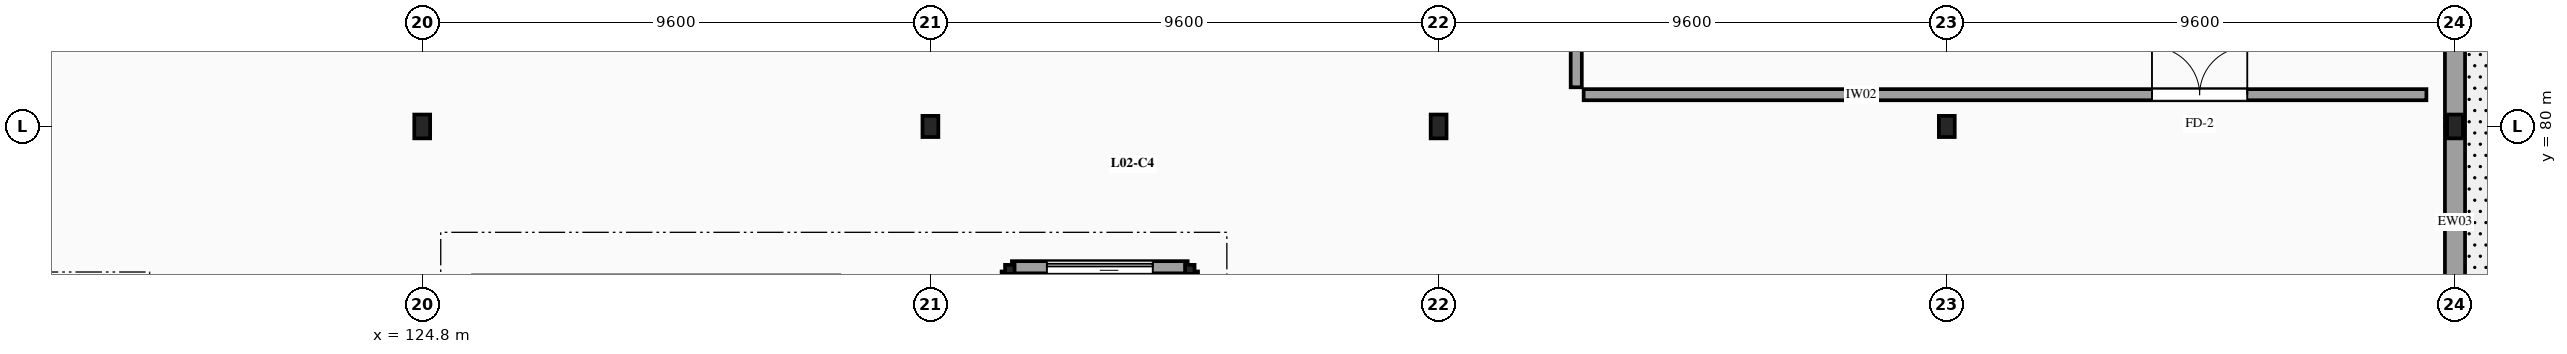
"""IFC4 building model, lengths in metres.
Left out: names, types, materials, properties, quantities, classifications, styles, units other than length and angle.
Written with IfcOpenShell. Run it as: python <this file> out.ifc"""

import sys

from ifc_helpers import new_model, si_unit, direction, frame, frame_2d, origin, origin_2d, place, context, subcontext, project, spatial, rectangle, i_section, extrude, element, fill, save


model = new_model("IFC4")
c1 = context("Model", 3, precision=1e-05, world=origin(), true_north=direction((0.0, 1.0)))
c2 = subcontext(c1, "Body", "Model", "MODEL_VIEW")
j1 = project(units=[si_unit("LENGTHUNIT", "METRE"), si_unit("PLANEANGLEUNIT", "RADIAN")], contexts=[c1])
p1 = place(None, origin())
s1 = spatial("IfcSite", under=j1, at=p1, CompositionType="ELEMENT")
p2 = place(p1, origin())
s2 = spatial("IfcBuilding", under=s1, at=p2, CompositionType="ELEMENT")
p3 = place(p2, frame((0.0, 0.0, 8.7)))
s3 = spatial("IfcBuildingStorey", under=s2, at=p3, CompositionType="ELEMENT", Elevation=8.7)
p4 = place(p3, frame((124.8, 80.0, -0.26), z_axis=(0.0, 0.0, 1.0), x_axis=(1.0, 0.0, 0.0)))
e1 = element("IfcColumn", 1, at=p4, inside=s3, PredefinedType="COLUMN", context=c2, shape_type="SweptSolid", body=[
    extrude(i_section(OverallWidth=0.3, OverallDepth=0.45, WebThickness=0.014, FlangeThickness=0.026, FilletRadius=0.027, at=origin_2d()), origin(), (0.0, 0.0, 1.0), 4.2),
])
p5 = place(p3, frame((134.4, 80.0, -0.26), z_axis=(0.0, 0.0, 1.0), x_axis=(1.0, 0.0, 0.0)))
e2 = element("IfcColumn", 2, at=p5, inside=s3, PredefinedType="COLUMN", context=c2, shape_type="SweptSolid", body=[
    extrude(i_section(OverallWidth=0.3, OverallDepth=0.4, WebThickness=0.013, FlangeThickness=0.024, FilletRadius=0.027, at=origin_2d()), origin(), (0.0, 0.0, 1.0), 4.2),
])
p6 = place(p3, frame((144.0, 80.0, -0.26), z_axis=(0.0, 0.0, 1.0), x_axis=(1.0, 0.0, 0.0)))
e3 = element("IfcColumn", 3, at=p6, inside=s3, PredefinedType="COLUMN", context=c2, shape_type="SweptSolid", body=[
    extrude(i_section(OverallWidth=0.3, OverallDepth=0.45, WebThickness=0.014, FlangeThickness=0.026, FilletRadius=0.027, at=origin_2d()), origin(), (0.0, 0.0, 1.0), 4.2),
])
p7 = place(p3, frame((153.6, 80.0, -0.26), z_axis=(0.0, 0.0, 1.0), x_axis=(1.0, 0.0, 0.0)))
e4 = element("IfcColumn", 4, at=p7, inside=s3, PredefinedType="COLUMN", context=c2, shape_type="SweptSolid", body=[
    extrude(i_section(OverallWidth=0.3, OverallDepth=0.4, WebThickness=0.013, FlangeThickness=0.024, FilletRadius=0.027, at=origin_2d()), origin(), (0.0, 0.0, 1.0), 4.2),
])
p8 = place(p3, frame((163.2, 80.0, -0.26), z_axis=(0.0, 0.0, 1.0), x_axis=(1.0, 0.0, 0.0)))
e5 = element("IfcColumn", 5, at=p8, inside=s3, PredefinedType="COLUMN", context=c2, shape_type="SweptSolid", body=[
    extrude(i_section(OverallWidth=0.3, OverallDepth=0.45, WebThickness=0.014, FlangeThickness=0.026, FilletRadius=0.027, at=origin_2d()), origin(), (0.0, 0.0, 1.0), 4.2),
])
for number, where, z_axis, x_axis in (
    (6, (139.3, 77.3, 0.0), (0.0, 0.0, 1.0), (1.0, 0.0, 0.0)),
    (7, (135.9, 77.3, 0.0), (0.0, 0.0, 1.0), (1.0, 0.0, 0.0)),
):
    element("IfcColumn", number, at=place(p3, frame(where, z_axis=z_axis, x_axis=x_axis)), inside=s3, PredefinedType="COLUMN", context=c2, shape_type="SweptSolid", body=[
        extrude(i_section(OverallWidth=0.18, OverallDepth=0.171, WebThickness=0.006, FlangeThickness=0.01, FilletRadius=0.015, at=origin_2d()), origin(), (0.0, 0.0, 1.0), 4.2),
    ])
p9 = place(p3, frame((163.2, 72.02, 0.0), z_axis=(0.0, 0.0, 1.0), x_axis=(0.0, 1.0, 0.0)))
e8 = element("IfcWall", 8, at=p9, inside=s3, PredefinedType="SOLIDWALL", context=c2, shape_type="SweptSolid", body=[
    extrude(rectangle(XDim=7.96, YDim=0.38, at=frame_2d((3.98, 0.0))), origin(), (0.0, 0.0, 1.0), 3.36),
])
p10 = place(p9, frame((2.8, 0.0, 0.0)))
e9 = element("IfcOpeningElement", 9, at=p10, cuts=e8, PredefinedType="OPENING", context=c2, shape_type="SweptSolid", body=[
    extrude(rectangle(XDim=1.35, YDim=2.2, at=frame_2d((0.675, 1.1))), frame((0.0, 0.2, 0.0), z_axis=(0.0, -1.0, 0.0), x_axis=(1.0, 0.0, 0.0)), (0.0, 0.0, 1.0), 0.4),
])
p11 = place(p3, frame((163.2, 80.02, 0.0), z_axis=(0.0, 0.0, 1.0), x_axis=(0.0, 1.0, 0.0)))
e10 = element("IfcWall", 10, at=p11, inside=s3, PredefinedType="SOLIDWALL", context=c2, shape_type="SweptSolid", body=[
    extrude(rectangle(XDim=7.96, YDim=0.38, at=frame_2d((3.98, 0.0))), origin(), (0.0, 0.0, 1.0), 3.36),
])
p12 = place(p11, frame((4.9, 0.0, 0.72)))
e11 = element("IfcOpeningElement", 11, at=p12, cuts=e10, PredefinedType="OPENING", context=c2, shape_type="SweptSolid", body=[
    extrude(rectangle(XDim=1.8, YDim=1.6, at=frame_2d((0.9, 0.8))), frame((0.0, 0.2, 0.0), z_axis=(0.0, -1.0, 0.0), x_axis=(1.0, 0.0, 0.0)), (0.0, 0.0, 1.0), 0.4),
])
p13 = place(p3, frame((135.94, 77.34, 0.0), z_axis=(0.0, 0.0, 1.0), x_axis=(1.0, 0.0, 0.0)))
e12 = element("IfcWall", 12, at=p13, inside=s3, PredefinedType="SOLIDWALL", context=c2, shape_type="SweptSolid", body=[
    extrude(rectangle(XDim=3.32, YDim=0.23, at=frame_2d((1.66, 0.0))), origin(), (0.0, 0.0, 1.0), 3.1),
])
p14 = place(p13, frame((0.66, 0.0, 0.0)))
e13 = element("IfcOpeningElement", 13, at=p14, cuts=e12, PredefinedType="OPENING", context=c2, shape_type="SweptSolid", body=[
    extrude(rectangle(XDim=2.0, YDim=2.5, at=frame_2d((1.0, 1.25))), frame((0.0, 0.125, 0.0), z_axis=(0.0, -1.0, 0.0), x_axis=(1.0, 0.0, 0.0)), (0.0, 0.0, 1.0), 0.25),
])
for number, where, z_axis, x_axis in (
    (14, (135.86, 73.14, 0.0), (0.0, 0.0, 1.0), (0.0, 1.0, 0.0)),
    (15, (139.34, 73.14, 0.0), (0.0, 0.0, 1.0), (0.0, 1.0, 0.0)),
):
    element("IfcWall", number, at=place(p3, frame(where, z_axis=z_axis, x_axis=x_axis)), inside=s3, PredefinedType="SOLIDWALL", context=c2, shape_type="SweptSolid", body=[
        extrude(rectangle(XDim=4.12, YDim=0.23, at=frame_2d((2.06, 0.0))), origin(), (0.0, 0.0, 1.0), 3.1),
    ])
p15 = place(p3, frame((146.74, 80.6, 0.0), z_axis=(0.0, 0.0, 1.0), x_axis=(1.0, 0.0, 0.0)))
e16 = element("IfcWall", 16, at=p15, inside=s3, PredefinedType="SOLIDWALL", context=c2, shape_type="SweptSolid", body=[
    extrude(rectangle(XDim=15.92, YDim=0.21, at=frame_2d((7.96, 0.0))), origin(), (0.0, 0.0, 1.0), 3.1),
])
p16 = place(p15, frame((10.736, 0.0, 0.0)))
e17 = element("IfcOpeningElement", 17, at=p16, cuts=e16, PredefinedType="OPENING", context=c2, shape_type="SweptSolid", body=[
    extrude(rectangle(XDim=1.8, YDim=2.4, at=frame_2d((0.9, 1.2))), frame((0.0, 0.115, 0.0), z_axis=(0.0, -1.0, 0.0), x_axis=(1.0, 0.0, 0.0)), (0.0, 0.0, 1.0), 0.23),
])
p17 = place(p3, frame((146.6, 80.74, 0.0), z_axis=(0.0, 0.0, 1.0), x_axis=(0.0, 1.0, 0.0)))
e18 = element("IfcWall", 18, at=p17, inside=s3, PredefinedType="SOLIDWALL", context=c2, shape_type="SweptSolid", body=[
    extrude(rectangle(XDim=15.09, YDim=0.21, at=frame_2d((7.545, 0.0))), origin(), (0.0, 0.0, 1.0), 3.1),
])
p18 = place(p14, origin())
e19 = element("IfcDoor", 19, at=p18, inside=s3, OperationType="SLIDING_TO_RIGHT", PredefinedType="DOOR", context=c2, shape_type="SweptSolid", body=[
    extrude(rectangle(XDim=2.0, YDim=2.5, at=frame_2d((1.0, 1.25))), frame((0.0, 0.025, 0.0), z_axis=(0.0, -1.0, 0.0), x_axis=(1.0, 0.0, 0.0)), (0.0, 0.0, 1.0), 0.05),
])
fill(e13, e19)
p19 = place(p16, origin())
e20 = element("IfcDoor", 20, at=p19, inside=s3, OperationType="DOUBLE_DOOR_SINGLE_SWING", PredefinedType="DOOR", context=c2, shape_type="SweptSolid", body=[
    extrude(rectangle(XDim=1.8, YDim=2.4, at=frame_2d((0.9, 1.2))), frame((0.0, 0.025, 0.0), z_axis=(0.0, -1.0, 0.0), x_axis=(1.0, 0.0, 0.0)), (0.0, 0.0, 1.0), 0.05),
])
fill(e17, e20)
save(model, sys.argv[1])
